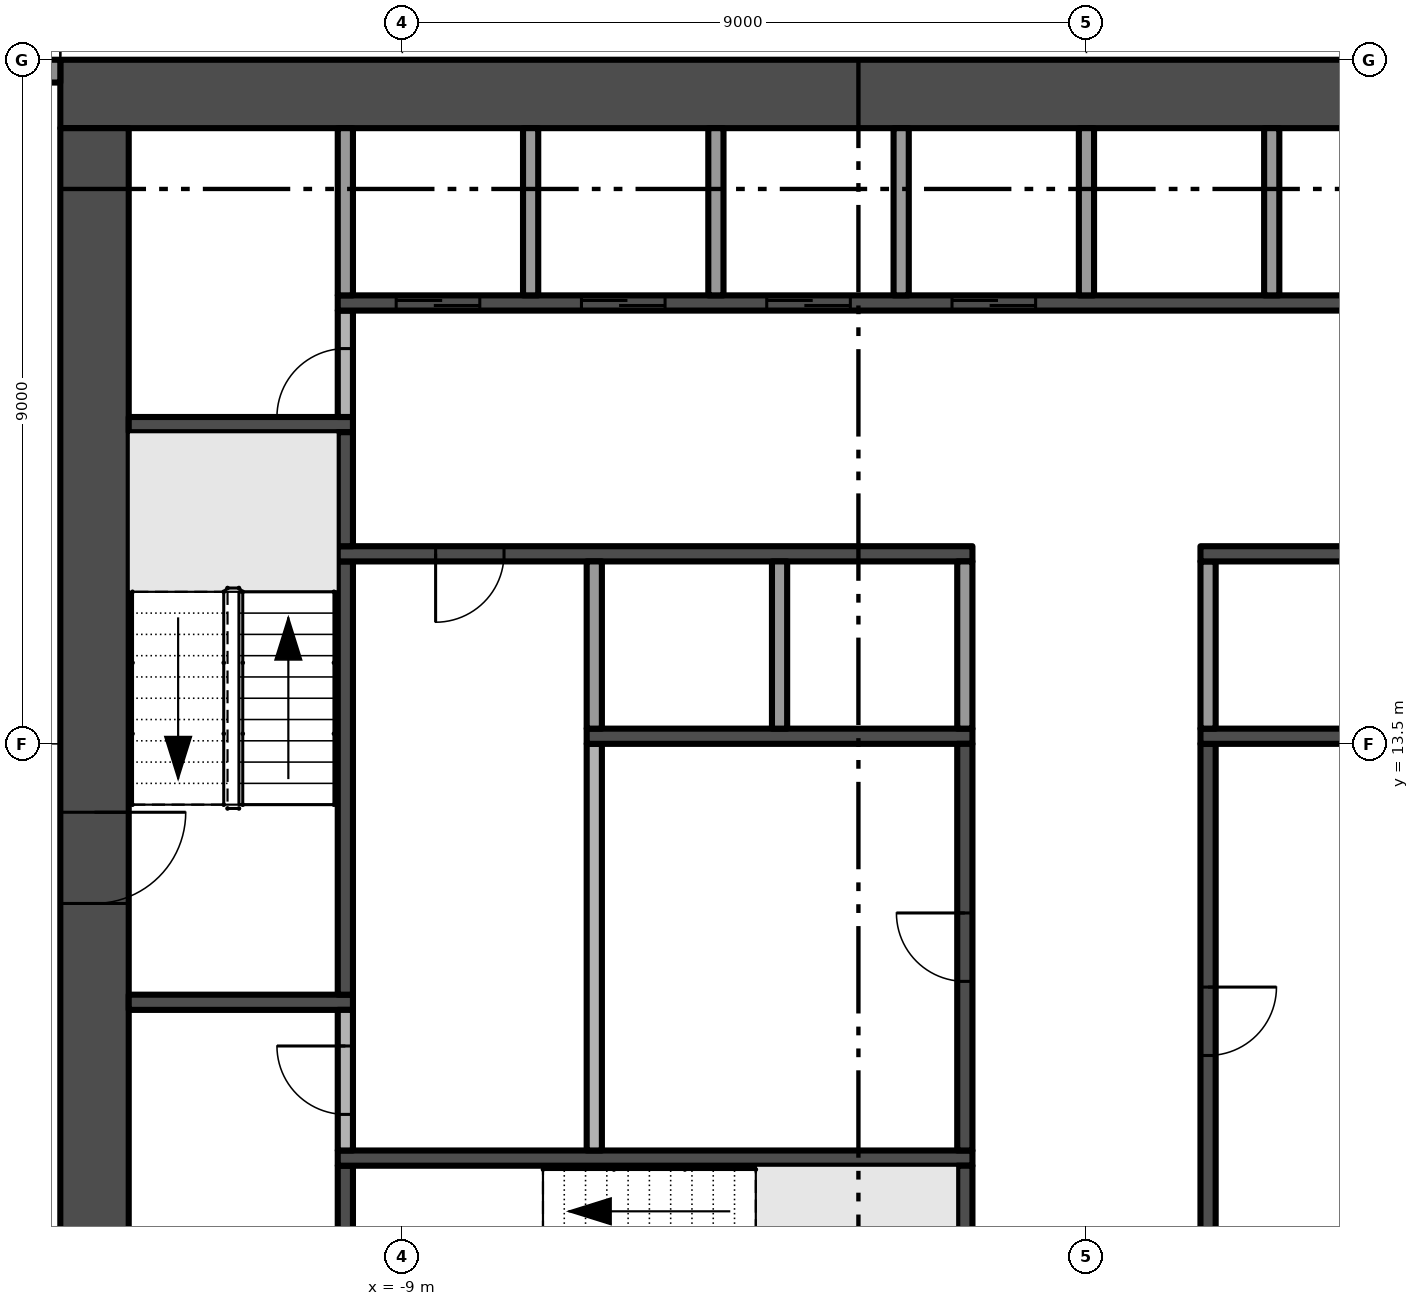
"""IFC4 building model, lengths in metres.
Left out: names, types, materials, properties, quantities, classifications, styles, units other than length and angle.
Written with IfcOpenShell. Run it as: python <this file> out.ifc"""

import sys

from ifc_helpers import new_model, si_unit, direction, frame, frame_2d, origin, place, context, subcontext, project, spatial, rectangle, extrude, element, fill, save


model = new_model("IFC4")
c1 = context("Model", 3, precision=1e-05, world=origin(), true_north=direction((0.0, 1.0)))
c2 = subcontext(c1, "Body", "Model", "MODEL_VIEW")
j1 = project(units=[si_unit("LENGTHUNIT", "METRE"), si_unit("PLANEANGLEUNIT", "RADIAN")], contexts=[c1])
p1 = place(None, origin())
s1 = spatial("IfcSite", under=j1, at=p1, CompositionType="ELEMENT")
p2 = place(p1, origin())
s2 = spatial("IfcBuilding", under=s1, at=p2, CompositionType="ELEMENT")
p3 = place(p2, frame((0.0, 0.0, 53.0)))
s3 = spatial("IfcBuildingStorey", under=s2, at=p3, CompositionType="ELEMENT", Elevation=53.0)
p4 = place(p3, frame((13.5, 22.05, -0.3), z_axis=(0.0, 0.0, 1.0), x_axis=(-1.0, 0.0, 0.0)))
e1 = element("IfcWall", 1, at=p4, inside=s3, PredefinedType="SHEAR", context=c2, shape_type="SweptSolid", body=[
    extrude(rectangle(XDim=27.0, YDim=0.9, at=frame_2d((13.5, 0.0))), origin(), (0.0, 0.0, 1.0), 3.8),
])
p5 = place(p3, frame((-13.05, 21.6, -0.3), z_axis=(0.0, 0.0, 1.0), x_axis=(0.0, -1.0, 0.0)))
e2 = element("IfcWall", 2, at=p5, inside=s3, PredefinedType="SHEAR", context=c2, shape_type="SweptSolid", body=[
    extrude(rectangle(XDim=16.2, YDim=0.9, at=frame_2d((8.1, 0.0))), origin(), (0.0, 0.0, 1.0), 3.8),
])
p6 = place(p5, frame((9.0, 0.0, 0.3)))
e3 = element("IfcOpeningElement", 3, at=p6, cuts=e2, PredefinedType="OPENING", context=c2, shape_type="SweptSolid", body=[
    extrude(rectangle(XDim=1.2, YDim=2.2, at=frame_2d((0.6, 1.1))), frame((0.0, 0.46, 0.0), z_axis=(0.0, -1.0, 0.0), x_axis=(1.0, 0.0, 0.0)), (0.0, 0.0, 1.0), 0.92),
])
p7 = place(p3, frame((-17.3, 22.35, 0.0), z_axis=(0.0, 0.0, 1.0), x_axis=(1.0, 0.0, 0.0)))
e4 = element("IfcWall", 4, at=p7, inside=s3, PredefinedType="SOLIDWALL", context=c2, shape_type="SweptSolid", body=[
    extrude(rectangle(XDim=3.8, YDim=0.3, at=frame_2d((1.9, 0.0))), origin(), (0.0, 0.0, 1.0), 3.5),
])
p8 = place(p7, frame((0.3, 0.0, 0.0)))
e5 = element("IfcOpeningElement", 5, at=p8, cuts=e4, PredefinedType="OPENING", context=c2, shape_type="SweptSolid", body=[
    extrude(rectangle(XDim=2.65, YDim=2.4, at=frame_2d((1.325, 1.2))), frame((0.0, 0.16, 0.0), z_axis=(0.0, -1.0, 0.0), x_axis=(1.0, 0.0, 0.0)), (0.0, 0.0, 1.0), 0.32),
])
for number, where, z_axis, x_axis in (
    (6, (-12.6, 10.1, 0.0), (0.0, 0.0, 1.0), (1.0, 0.0, 0.0)),
    (7, (-12.6, 17.7, 0.0), (0.0, 0.0, 1.0), (1.0, 0.0, 0.0)),
):
    element("IfcWall", number, at=place(p3, frame(where, z_axis=z_axis, x_axis=x_axis)), inside=s3, PredefinedType="SHEAR", context=c2, shape_type="SweptSolid", body=[
        extrude(rectangle(XDim=2.95, YDim=0.2, at=frame_2d((1.475, 0.0))), origin(), (0.0, 0.0, 1.0), 3.5),
    ])
p9 = place(p3, frame((-9.75, 5.4, 0.0), z_axis=(0.0, 0.0, 1.0), x_axis=(0.0, 1.0, 0.0)))
e8 = element("IfcWall", 8, at=p9, inside=s3, PredefinedType="SHEAR", context=c2, shape_type="SweptSolid", body=[
    extrude(rectangle(XDim=2.55, YDim=0.2, at=frame_2d((1.275, 0.0))), origin(), (0.0, 0.0, 1.0), 3.5),
])
p10 = place(p3, frame((-9.85, 8.05, 0.0), z_axis=(0.0, 0.0, 1.0), x_axis=(1.0, 0.0, 0.0)))
e9 = element("IfcWall", 9, at=p10, inside=s3, PredefinedType="SHEAR", context=c2, shape_type="SweptSolid", body=[
    extrude(rectangle(XDim=8.35, YDim=0.2, at=frame_2d((4.175, 0.0))), origin(), (0.0, 0.0, 1.0), 3.5),
])
p11 = place(p3, frame((-9.75, 8.15, 0.0), z_axis=(0.0, 0.0, 1.0), x_axis=(0.0, 1.0, 0.0)))
e10 = element("IfcWall", 10, at=p11, inside=s3, PredefinedType="PARTITIONING", context=c2, shape_type="SweptSolid", body=[
    extrude(rectangle(XDim=1.85, YDim=0.2, at=frame_2d((0.925, 0.0))), origin(), (0.0, 0.0, 1.0), 3.5),
])
p12 = place(p11, frame((0.475, 0.0, 0.0)))
e11 = element("IfcOpeningElement", 11, at=p12, cuts=e10, PredefinedType="OPENING", context=c2, shape_type="SweptSolid", body=[
    extrude(rectangle(XDim=0.9, YDim=2.1, at=frame_2d((0.45, 1.05))), frame((0.0, 0.11, 0.0), z_axis=(0.0, -1.0, 0.0), x_axis=(1.0, 0.0, 0.0)), (0.0, 0.0, 1.0), 0.22),
])
p13 = place(p3, frame((-9.75, 10.2, 0.0), z_axis=(0.0, 0.0, 1.0), x_axis=(0.0, 1.0, 0.0)))
e12 = element("IfcWall", 12, at=p13, inside=s3, PredefinedType="SHEAR", context=c2, shape_type="SweptSolid", body=[
    extrude(rectangle(XDim=5.7, YDim=0.2, at=frame_2d((2.85, 0.0))), origin(), (0.0, 0.0, 1.0), 3.5),
])
p14 = place(p3, frame((-1.5, 16.0, 0.0), z_axis=(0.0, 0.0, 1.0), x_axis=(-1.0, 0.0, 0.0)))
e13 = element("IfcWall", 13, at=p14, inside=s3, PredefinedType="SHEAR", context=c2, shape_type="SweptSolid", body=[
    extrude(rectangle(XDim=8.35, YDim=0.2, at=frame_2d((4.175, 0.0))), origin(), (0.0, 0.0, 1.0), 3.5),
])
p15 = place(p14, frame((6.162, 0.0, 0.0)))
e14 = element("IfcOpeningElement", 14, at=p15, cuts=e13, PredefinedType="OPENING", context=c2, shape_type="SweptSolid", body=[
    extrude(rectangle(XDim=0.9, YDim=2.1, at=frame_2d((0.45, 1.05))), frame((0.0, 0.11, 0.0), z_axis=(0.0, -1.0, 0.0), x_axis=(1.0, 0.0, 0.0)), (0.0, 0.0, 1.0), 0.22),
])
p16 = place(p3, frame((-9.75, 16.1, 0.0), z_axis=(0.0, 0.0, 1.0), x_axis=(0.0, 1.0, 0.0)))
e15 = element("IfcWall", 15, at=p16, inside=s3, PredefinedType="SHEAR", context=c2, shape_type="SweptSolid", body=[
    extrude(rectangle(XDim=1.5, YDim=0.2, at=frame_2d((0.75, 0.0))), origin(), (0.0, 0.0, 1.0), 3.5),
])
p17 = place(p3, frame((-9.75, 17.8, 0.0), z_axis=(0.0, 0.0, 1.0), x_axis=(0.0, 1.0, 0.0)))
e16 = element("IfcWall", 16, at=p17, inside=s3, PredefinedType="PARTITIONING", context=c2, shape_type="SweptSolid", body=[
    extrude(rectangle(XDim=1.4, YDim=0.2, at=frame_2d((0.7, 0.0))), origin(), (0.0, 0.0, 1.0), 3.5),
])
p18 = place(p17, origin())
e17 = element("IfcOpeningElement", 17, at=p18, cuts=e16, PredefinedType="OPENING", context=c2, shape_type="SweptSolid", body=[
    extrude(rectangle(XDim=0.9, YDim=2.1, at=frame_2d((0.45, 1.05))), frame((0.0, 0.11, 0.0), z_axis=(0.0, -1.0, 0.0), x_axis=(1.0, 0.0, 0.0)), (0.0, 0.0, 1.0), 0.22),
])
p19 = place(p3, frame((-9.85, 19.3, 0.0), z_axis=(0.0, 0.0, 1.0), x_axis=(1.0, 0.0, 0.0)))
e18 = element("IfcWall", 18, at=p19, inside=s3, PredefinedType="SHEAR", context=c2, shape_type="SweptSolid", body=[
    extrude(rectangle(XDim=19.7, YDim=0.2, at=frame_2d((9.85, 0.0))), origin(), (0.0, 0.0, 1.0), 3.5),
])
p20 = place(p19, frame((0.769, 0.0, 0.0)))
e19 = element("IfcOpeningElement", 19, at=p20, cuts=e18, PredefinedType="OPENING", context=c2, shape_type="SweptSolid", body=[
    extrude(rectangle(XDim=1.1, YDim=2.1, at=frame_2d((0.55, 1.05))), frame((0.0, 0.11, 0.0), z_axis=(0.0, -1.0, 0.0), x_axis=(1.0, 0.0, 0.0)), (0.0, 0.0, 1.0), 0.22),
])
p21 = place(p19, frame((3.206, 0.0, 0.0)))
e20 = element("IfcOpeningElement", 20, at=p21, cuts=e18, PredefinedType="OPENING", context=c2, shape_type="SweptSolid", body=[
    extrude(rectangle(XDim=1.1, YDim=2.1, at=frame_2d((0.55, 1.05))), frame((0.0, 0.11, 0.0), z_axis=(0.0, -1.0, 0.0), x_axis=(1.0, 0.0, 0.0)), (0.0, 0.0, 1.0), 0.22),
])
p22 = place(p19, frame((5.644, 0.0, 0.0)))
e21 = element("IfcOpeningElement", 21, at=p22, cuts=e18, PredefinedType="OPENING", context=c2, shape_type="SweptSolid", body=[
    extrude(rectangle(XDim=1.1, YDim=2.1, at=frame_2d((0.55, 1.05))), frame((0.0, 0.11, 0.0), z_axis=(0.0, -1.0, 0.0), x_axis=(1.0, 0.0, 0.0)), (0.0, 0.0, 1.0), 0.22),
])
p23 = place(p19, frame((8.081, 0.0, 0.0)))
e22 = element("IfcOpeningElement", 22, at=p23, cuts=e18, PredefinedType="OPENING", context=c2, shape_type="SweptSolid", body=[
    extrude(rectangle(XDim=1.1, YDim=2.1, at=frame_2d((0.55, 1.05))), frame((0.0, 0.11, 0.0), z_axis=(0.0, -1.0, 0.0), x_axis=(1.0, 0.0, 0.0)), (0.0, 0.0, 1.0), 0.22),
])
for number, where, z_axis, x_axis in (
    (23, (-9.75, 19.4, 0.0), (0.0, 0.0, 1.0), (0.0, 1.0, 0.0)),
    (24, (-7.312, 19.4, 0.0), (0.0, 0.0, 1.0), (0.0, 1.0, 0.0)),
):
    element("IfcWall", number, at=place(p3, frame(where, z_axis=z_axis, x_axis=x_axis)), inside=s3, PredefinedType="PARTITIONING", context=c2, shape_type="SweptSolid", body=[
        extrude(rectangle(XDim=2.2, YDim=0.2, at=frame_2d((1.1, 0.0))), origin(), (0.0, 0.0, 1.0), 3.5),
    ])
p24 = place(p3, frame((-6.475, 8.15, 0.0), z_axis=(0.0, 0.0, 1.0), x_axis=(0.0, 1.0, 0.0)))
e25 = element("IfcWall", 25, at=p24, inside=s3, PredefinedType="PARTITIONING", context=c2, shape_type="SweptSolid", body=[
    extrude(rectangle(XDim=5.35, YDim=0.2, at=frame_2d((2.675, 0.0))), origin(), (0.0, 0.0, 1.0), 3.5),
])
p25 = place(p3, frame((-6.575, 13.6, 0.0), z_axis=(0.0, 0.0, 1.0), x_axis=(1.0, 0.0, 0.0)))
e26 = element("IfcWall", 26, at=p25, inside=s3, PredefinedType="SHEAR", context=c2, shape_type="SweptSolid", body=[
    extrude(rectangle(XDim=5.075, YDim=0.2, at=frame_2d((2.538, 0.0))), origin(), (0.0, 0.0, 1.0), 3.5),
])
for number, where, z_axis, x_axis in (
    (27, (-6.475, 13.7, 0.0), (0.0, 0.0, 1.0), (0.0, 1.0, 0.0)),
    (28, (-4.875, 19.4, 0.0), (0.0, 0.0, 1.0), (0.0, 1.0, 0.0)),
    (29, (-4.037, 13.7, 0.0), (0.0, 0.0, 1.0), (0.0, 1.0, 0.0)),
    (30, (-2.438, 19.4, 0.0), (0.0, 0.0, 1.0), (0.0, 1.0, 0.0)),
):
    element("IfcWall", number, at=place(p3, frame(where, z_axis=z_axis, x_axis=x_axis)), inside=s3, PredefinedType="PARTITIONING", context=c2, shape_type="SweptSolid", body=[
        extrude(rectangle(XDim=2.2, YDim=0.2, at=frame_2d((1.1, 0.0))), origin(), (0.0, 0.0, 1.0), 3.5),
    ])
p26 = place(p3, frame((-1.6, 5.4, 0.0), z_axis=(0.0, 0.0, 1.0), x_axis=(0.0, 1.0, 0.0)))
e31 = element("IfcWall", 31, at=p26, inside=s3, PredefinedType="SHEAR", context=c2, shape_type="SweptSolid", body=[
    extrude(rectangle(XDim=2.55, YDim=0.2, at=frame_2d((1.275, 0.0))), origin(), (0.0, 0.0, 1.0), 3.5),
])
p27 = place(p3, frame((-1.6, 8.15, 0.0), z_axis=(0.0, 0.0, 1.0), x_axis=(0.0, 1.0, 0.0)))
e32 = element("IfcWall", 32, at=p27, inside=s3, PredefinedType="SHEAR", context=c2, shape_type="SweptSolid", body=[
    extrude(rectangle(XDim=5.35, YDim=0.2, at=frame_2d((2.675, 0.0))), origin(), (0.0, 0.0, 1.0), 3.5),
])
p28 = place(p27, frame((2.225, 0.0, 0.0)))
e33 = element("IfcOpeningElement", 33, at=p28, cuts=e32, PredefinedType="OPENING", context=c2, shape_type="SweptSolid", body=[
    extrude(rectangle(XDim=0.9, YDim=2.1, at=frame_2d((0.45, 1.05))), frame((0.0, 0.11, 0.0), z_axis=(0.0, -1.0, 0.0), x_axis=(1.0, 0.0, 0.0)), (0.0, 0.0, 1.0), 0.22),
])
for number, where, z_axis, x_axis in (
    (34, (-1.6, 13.7, 0.0), (0.0, 0.0, 1.0), (0.0, 1.0, 0.0)),
    (35, (0.0, 19.4, 0.0), (0.0, 0.0, 1.0), (0.0, 1.0, 0.0)),
):
    element("IfcWall", number, at=place(p3, frame(where, z_axis=z_axis, x_axis=x_axis)), inside=s3, PredefinedType="PARTITIONING", context=c2, shape_type="SweptSolid", body=[
        extrude(rectangle(XDim=2.2, YDim=0.2, at=frame_2d((1.1, 0.0))), origin(), (0.0, 0.0, 1.0), 3.5),
    ])
p29 = place(p3, frame((1.6, 13.5, 0.0), z_axis=(0.0, 0.0, 1.0), x_axis=(0.0, -1.0, 0.0)))
e36 = element("IfcWall", 36, at=p29, inside=s3, PredefinedType="SHEAR", context=c2, shape_type="SweptSolid", body=[
    extrude(rectangle(XDim=8.1, YDim=0.2, at=frame_2d((4.05, 0.0))), origin(), (0.0, 0.0, 1.0), 3.5),
])
p30 = place(p29, frame((3.2, 0.0, 0.0)))
e37 = element("IfcOpeningElement", 37, at=p30, cuts=e36, PredefinedType="OPENING", context=c2, shape_type="SweptSolid", body=[
    extrude(rectangle(XDim=0.9, YDim=2.1, at=frame_2d((0.45, 1.05))), frame((0.0, 0.11, 0.0), z_axis=(0.0, -1.0, 0.0), x_axis=(1.0, 0.0, 0.0)), (0.0, 0.0, 1.0), 0.22),
])
p31 = place(p3, frame((1.5, 13.6, 0.0), z_axis=(0.0, 0.0, 1.0), x_axis=(1.0, 0.0, 0.0)))
e38 = element("IfcWall", 38, at=p31, inside=s3, PredefinedType="SHEAR", context=c2, shape_type="SweptSolid", body=[
    extrude(rectangle(XDim=5.075, YDim=0.2, at=frame_2d((2.538, 0.0))), origin(), (0.0, 0.0, 1.0), 3.5),
])
p32 = place(p3, frame((1.6, 13.7, 0.0), z_axis=(0.0, 0.0, 1.0), x_axis=(0.0, 1.0, 0.0)))
e39 = element("IfcWall", 39, at=p32, inside=s3, PredefinedType="PARTITIONING", context=c2, shape_type="SweptSolid", body=[
    extrude(rectangle(XDim=2.2, YDim=0.2, at=frame_2d((1.1, 0.0))), origin(), (0.0, 0.0, 1.0), 3.5),
])
p33 = place(p3, frame((9.85, 16.0, 0.0), z_axis=(0.0, 0.0, 1.0), x_axis=(-1.0, 0.0, 0.0)))
e40 = element("IfcWall", 40, at=p33, inside=s3, PredefinedType="SHEAR", context=c2, shape_type="SweptSolid", body=[
    extrude(rectangle(XDim=8.35, YDim=0.2, at=frame_2d((4.175, 0.0))), origin(), (0.0, 0.0, 1.0), 3.5),
])
p34 = place(p33, frame((1.288, 0.0, 0.0)))
e41 = element("IfcOpeningElement", 41, at=p34, cuts=e40, PredefinedType="OPENING", context=c2, shape_type="SweptSolid", body=[
    extrude(rectangle(XDim=0.9, YDim=2.1, at=frame_2d((0.45, 1.05))), frame((0.0, 0.11, 0.0), z_axis=(0.0, -1.0, 0.0), x_axis=(1.0, 0.0, 0.0)), (0.0, 0.0, 1.0), 0.22),
])
p35 = place(p3, frame((2.438, 19.4, 0.0), z_axis=(0.0, 0.0, 1.0), x_axis=(0.0, 1.0, 0.0)))
e42 = element("IfcWall", 42, at=p35, inside=s3, PredefinedType="PARTITIONING", context=c2, shape_type="SweptSolid", body=[
    extrude(rectangle(XDim=2.2, YDim=0.2, at=frame_2d((1.1, 0.0))), origin(), (0.0, 0.0, 1.0), 3.5),
])
p36 = place(p6, frame((1.2, 0.0, 0.0), z_axis=(0.0, 0.0, 1.0), x_axis=(-1.0, 0.0, 0.0)))
e43 = element("IfcDoor", 43, at=p36, inside=s3, OperationType="SINGLE_SWING_RIGHT", PredefinedType="DOOR", context=c2, shape_type="SweptSolid", body=[
    extrude(rectangle(XDim=1.2, YDim=2.2, at=frame_2d((0.6, 1.1))), frame((0.0, 0.025, 0.0), z_axis=(0.0, -1.0, 0.0), x_axis=(1.0, 0.0, 0.0)), (0.0, 0.0, 1.0), 0.05),
])
fill(e3, e43)
p37 = place(p20, origin())
e44 = element("IfcDoor", 44, at=p37, inside=s3, OperationType="SLIDING_TO_LEFT", PredefinedType="DOOR", context=c2, shape_type="SweptSolid", body=[
    extrude(rectangle(XDim=1.1, YDim=2.1, at=frame_2d((0.55, 1.05))), frame((0.0, 0.025, 0.0), z_axis=(0.0, -1.0, 0.0), x_axis=(1.0, 0.0, 0.0)), (0.0, 0.0, 1.0), 0.05),
])
fill(e19, e44)
p38 = place(p21, origin())
e45 = element("IfcDoor", 45, at=p38, inside=s3, OperationType="SLIDING_TO_LEFT", PredefinedType="DOOR", context=c2, shape_type="SweptSolid", body=[
    extrude(rectangle(XDim=1.1, YDim=2.1, at=frame_2d((0.55, 1.05))), frame((0.0, 0.025, 0.0), z_axis=(0.0, -1.0, 0.0), x_axis=(1.0, 0.0, 0.0)), (0.0, 0.0, 1.0), 0.05),
])
fill(e20, e45)
p39 = place(p22, origin())
e46 = element("IfcDoor", 46, at=p39, inside=s3, OperationType="SLIDING_TO_LEFT", PredefinedType="DOOR", context=c2, shape_type="SweptSolid", body=[
    extrude(rectangle(XDim=1.1, YDim=2.1, at=frame_2d((0.55, 1.05))), frame((0.0, 0.025, 0.0), z_axis=(0.0, -1.0, 0.0), x_axis=(1.0, 0.0, 0.0)), (0.0, 0.0, 1.0), 0.05),
])
fill(e21, e46)
p40 = place(p23, origin())
e47 = element("IfcDoor", 47, at=p40, inside=s3, OperationType="SLIDING_TO_LEFT", PredefinedType="DOOR", context=c2, shape_type="SweptSolid", body=[
    extrude(rectangle(XDim=1.1, YDim=2.1, at=frame_2d((0.55, 1.05))), frame((0.0, 0.025, 0.0), z_axis=(0.0, -1.0, 0.0), x_axis=(1.0, 0.0, 0.0)), (0.0, 0.0, 1.0), 0.05),
])
fill(e22, e47)
p41 = place(p15, origin())
e48 = element("IfcDoor", 48, at=p41, inside=s3, OperationType="SINGLE_SWING_RIGHT", PredefinedType="DOOR", context=c2, shape_type="SweptSolid", body=[
    extrude(rectangle(XDim=0.9, YDim=2.1, at=frame_2d((0.45, 1.05))), frame((0.0, 0.025, 0.0), z_axis=(0.0, -1.0, 0.0), x_axis=(1.0, 0.0, 0.0)), (0.0, 0.0, 1.0), 0.05),
])
fill(e14, e48)
p42 = place(p28, origin())
e49 = element("IfcDoor", 49, at=p42, inside=s3, OperationType="SINGLE_SWING_RIGHT", PredefinedType="DOOR", context=c2, shape_type="SweptSolid", body=[
    extrude(rectangle(XDim=0.9, YDim=2.1, at=frame_2d((0.45, 1.05))), frame((0.0, 0.025, 0.0), z_axis=(0.0, -1.0, 0.0), x_axis=(1.0, 0.0, 0.0)), (0.0, 0.0, 1.0), 0.05),
])
fill(e33, e49)
p43 = place(p30, origin())
e50 = element("IfcDoor", 50, at=p43, inside=s3, OperationType="SINGLE_SWING_LEFT", PredefinedType="DOOR", context=c2, shape_type="SweptSolid", body=[
    extrude(rectangle(XDim=0.9, YDim=2.1, at=frame_2d((0.45, 1.05))), frame((0.0, 0.025, 0.0), z_axis=(0.0, -1.0, 0.0), x_axis=(1.0, 0.0, 0.0)), (0.0, 0.0, 1.0), 0.05),
])
fill(e37, e50)
p44 = place(p18, origin())
e51 = element("IfcDoor", 51, at=p44, inside=s3, OperationType="SINGLE_SWING_LEFT", PredefinedType="DOOR", context=c2, shape_type="SweptSolid", body=[
    extrude(rectangle(XDim=0.9, YDim=2.1, at=frame_2d((0.45, 1.05))), frame((0.0, 0.025, 0.0), z_axis=(0.0, -1.0, 0.0), x_axis=(1.0, 0.0, 0.0)), (0.0, 0.0, 1.0), 0.05),
])
fill(e17, e51)
p45 = place(p12, origin())
e52 = element("IfcDoor", 52, at=p45, inside=s3, OperationType="SINGLE_SWING_RIGHT", PredefinedType="DOOR", context=c2, shape_type="SweptSolid", body=[
    extrude(rectangle(XDim=0.9, YDim=2.1, at=frame_2d((0.45, 1.05))), frame((0.0, 0.025, 0.0), z_axis=(0.0, -1.0, 0.0), x_axis=(1.0, 0.0, 0.0)), (0.0, 0.0, 1.0), 0.05),
])
fill(e11, e52)
save(model, sys.argv[1])
